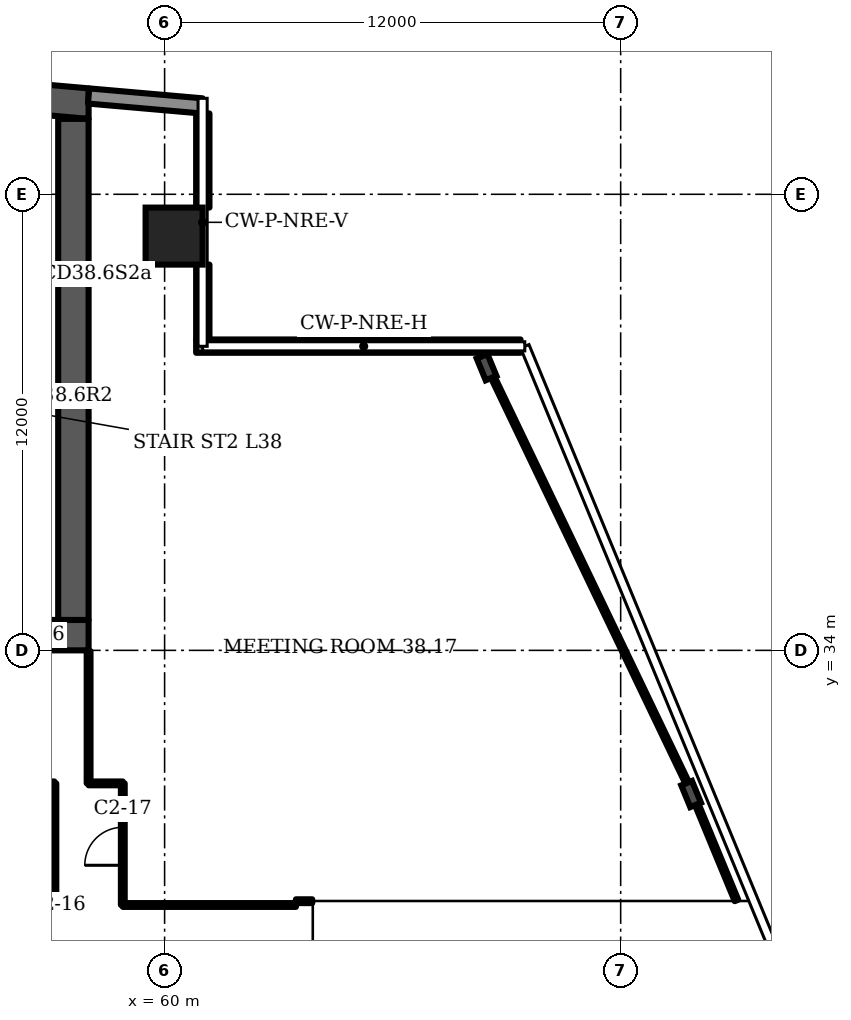
"""IFC4 building model, lengths in metres.
Left out: names, types, materials, properties, quantities, classifications, styles, units other than length and angle.
Written with IfcOpenShell. Run it as: python <this file> out.ifc"""

import sys

from ifc_helpers import new_model, si_unit, direction, frame, frame_2d, origin, origin_2d, place, context, subcontext, project, spatial, polyline, rectangle, i_section, outline, extrude, element, fill, save


model = new_model("IFC4")
c1 = context("Model", 3, precision=1e-05, world=origin(), true_north=direction((0.0, 1.0)))
c2 = subcontext(c1, "Body", "Model", "MODEL_VIEW")
j1 = project(units=[si_unit("LENGTHUNIT", "METRE"), si_unit("PLANEANGLEUNIT", "RADIAN")], contexts=[c1])
p1 = place(None, origin())
s1 = spatial("IfcSite", under=j1, at=p1, CompositionType="ELEMENT")
p2 = place(p1, origin())
s2 = spatial("IfcBuilding", under=s1, at=p2, CompositionType="ELEMENT")
p3 = place(p2, frame((0.0, 0.0, 159.1)))
s3 = spatial("IfcBuildingStorey", under=s2, at=p3, CompositionType="ELEMENT", Elevation=159.1)
p4 = place(p3, frame((0.0, 0.0, -0.0)))
e1 = element("IfcWall", 1, at=p4, inside=s3, PredefinedType="SHEAR", context=c2, shape_type="SweptSolid", body=[
    extrude(outline(polyline([(16.0, 47.984), (37.0, 49.822), (58.0, 47.984), (58.0, 48.787), (37.0, 50.625), (16.0, 48.787), (16.0, 47.984)])), origin(), (0.0, 0.0, 1.0), 3.6),
])
p5 = place(p3, frame((16.0, 34.4, 0.0), z_axis=(0.0, 0.0, 1.0), x_axis=(1.0, 0.0, 0.0)))
e2 = element("IfcWall", 2, at=p5, inside=s3, PredefinedType="SHEAR", context=c2, shape_type="SweptSolid", body=[
    extrude(rectangle(XDim=42.0, YDim=0.8, at=frame_2d((21.0, 0.0))), origin(), (0.0, 0.0, 1.0), 3.6),
])
p6 = place(p5, frame((3.2, 0.0, 0.0)))
e3 = element("IfcOpeningElement", 3, at=p6, cuts=e2, PredefinedType="OPENING", context=c2, shape_type="SweptSolid", body=[
    extrude(rectangle(XDim=1.0, YDim=2.1, at=frame_2d((0.5, 1.05))), frame((0.0, 0.41, 0.0), z_axis=(0.0, -1.0, 0.0), x_axis=(1.0, 0.0, 0.0)), (0.0, 0.0, 1.0), 0.82),
])
p7 = place(p5, frame((7.65, 0.0, 0.0)))
e4 = element("IfcOpeningElement", 4, at=p7, cuts=e2, PredefinedType="OPENING", context=c2, shape_type="SweptSolid", body=[
    extrude(rectangle(XDim=1.2, YDim=2.1, at=frame_2d((0.6, 1.05))), frame((0.0, 0.41, 0.0), z_axis=(0.0, -1.0, 0.0), x_axis=(1.0, 0.0, 0.0)), (0.0, 0.0, 1.0), 0.82),
])
p8 = place(p5, frame((14.767, 0.0, 0.0)))
e5 = element("IfcOpeningElement", 5, at=p8, cuts=e2, PredefinedType="OPENING", context=c2, shape_type="SweptSolid", body=[
    extrude(rectangle(XDim=1.1, YDim=2.1, at=frame_2d((0.55, 1.05))), frame((0.0, 0.41, 0.0), z_axis=(0.0, -1.0, 0.0), x_axis=(1.0, 0.0, 0.0)), (0.0, 0.0, 1.0), 0.82),
])
p9 = place(p5, frame((19.133, 0.0, 0.0)))
e6 = element("IfcOpeningElement", 6, at=p9, cuts=e2, PredefinedType="OPENING", context=c2, shape_type="SweptSolid", body=[
    extrude(rectangle(XDim=1.1, YDim=2.1, at=frame_2d((0.55, 1.05))), frame((0.0, 0.41, 0.0), z_axis=(0.0, -1.0, 0.0), x_axis=(1.0, 0.0, 0.0)), (0.0, 0.0, 1.0), 0.82),
])
p10 = place(p5, frame((16.8, 0.0, 0.0)))
e7 = element("IfcOpeningElement", 7, at=p10, cuts=e2, PredefinedType="OPENING", context=c2, shape_type="SweptSolid", body=[
    extrude(rectangle(XDim=1.4, YDim=2.1, at=frame_2d((0.7, 1.05))), frame((0.0, 0.41, 0.0), z_axis=(0.0, -1.0, 0.0), x_axis=(1.0, 0.0, 0.0)), (0.0, 0.0, 1.0), 0.82),
])
p11 = place(p5, frame((21.767, 0.0, 0.0)))
e8 = element("IfcOpeningElement", 8, at=p11, cuts=e2, PredefinedType="OPENING", context=c2, shape_type="SweptSolid", body=[
    extrude(rectangle(XDim=1.1, YDim=2.1, at=frame_2d((0.55, 1.05))), frame((0.0, 0.41, 0.0), z_axis=(0.0, -1.0, 0.0), x_axis=(1.0, 0.0, 0.0)), (0.0, 0.0, 1.0), 0.82),
])
p12 = place(p5, frame((23.95, 0.0, 0.0)))
e9 = element("IfcOpeningElement", 9, at=p12, cuts=e2, PredefinedType="OPENING", context=c2, shape_type="SweptSolid", body=[
    extrude(rectangle(XDim=1.1, YDim=2.1, at=frame_2d((0.55, 1.05))), frame((0.0, 0.41, 0.0), z_axis=(0.0, -1.0, 0.0), x_axis=(1.0, 0.0, 0.0)), (0.0, 0.0, 1.0), 0.82),
])
p13 = place(p5, frame((26.133, 0.0, 0.0)))
e10 = element("IfcOpeningElement", 10, at=p13, cuts=e2, PredefinedType="OPENING", context=c2, shape_type="SweptSolid", body=[
    extrude(rectangle(XDim=1.1, YDim=2.1, at=frame_2d((0.55, 1.05))), frame((0.0, 0.41, 0.0), z_axis=(0.0, -1.0, 0.0), x_axis=(1.0, 0.0, 0.0)), (0.0, 0.0, 1.0), 0.82),
])
p14 = place(p5, frame((33.15, 0.0, 0.0)))
e11 = element("IfcOpeningElement", 11, at=p14, cuts=e2, PredefinedType="OPENING", context=c2, shape_type="SweptSolid", body=[
    extrude(rectangle(XDim=1.2, YDim=2.1, at=frame_2d((0.6, 1.05))), frame((0.0, 0.41, 0.0), z_axis=(0.0, -1.0, 0.0), x_axis=(1.0, 0.0, 0.0)), (0.0, 0.0, 1.0), 0.82),
])
p15 = place(p5, frame((37.767, 0.0, 0.0)))
e12 = element("IfcOpeningElement", 12, at=p15, cuts=e2, PredefinedType="OPENING", context=c2, shape_type="SweptSolid", body=[
    extrude(rectangle(XDim=1.4, YDim=2.1, at=frame_2d((0.7, 1.05))), frame((0.0, 0.41, 0.0), z_axis=(0.0, -1.0, 0.0), x_axis=(1.0, 0.0, 0.0)), (0.0, 0.0, 1.0), 0.82),
])
p16 = place(p3, frame((57.6, 34.8, 0.0), z_axis=(0.0, 0.0, 1.0), x_axis=(0.0, 1.0, 0.0)))
e13 = element("IfcWall", 13, at=p16, inside=s3, PredefinedType="SHEAR", context=c2, shape_type="SweptSolid", body=[
    extrude(rectangle(XDim=13.184, YDim=0.8, at=frame_2d((6.592, 0.0))), origin(), (0.0, 0.0, 1.0), 3.6),
])
p17 = place(p3, frame((60.25, 44.9, 0.0), z_axis=(0.0, 0.0, 1.0), x_axis=(1.0, 0.0, 0.0)))
e14 = element("IfcColumn", 14, at=p17, inside=s3, PredefinedType="COLUMN", context=c2, shape_type="SweptSolid", body=[
    extrude(rectangle(XDim=1.5, YDim=1.5, at=origin_2d()), origin(), (0.0, 0.0, 1.0), 3.6),
])
for number, where, z_axis, x_axis in (
    (15, (73.854, 30.219, 0.0), (0.0, 0.0, 1.0), (0.924, 0.382, 0.0)),
    (16, (68.472, 41.45, 0.0), (0.0, 0.0, 1.0), (0.924, 0.382, 0.0)),
):
    element("IfcColumn", number, at=place(p3, frame(where, z_axis=z_axis, x_axis=x_axis)), inside=s3, PredefinedType="COLUMN", context=c2, shape_type="SweptSolid", body=[
        extrude(i_section(OverallWidth=0.305, OverallDepth=0.62, WebThickness=0.021, FlangeThickness=0.04, FilletRadius=0.027, at=origin_2d()), origin(), (0.0, 0.0, 1.0), 3.6),
    ])
p18 = place(p3, frame((60.983, 48.326, 0.0), z_axis=(0.0, 0.0, 1.0), x_axis=(-0.996194, 0.087168, 0.0)))
e17 = element("IfcWall", 17, at=p18, inside=s3, PredefinedType="SOLIDWALL", context=c2, shape_type="SweptSolid", body=[
    extrude(rectangle(XDim=2.994, YDim=0.4, at=frame_2d((1.497, 0.0))), origin(), (0.0, 0.0, 1.0), 3.2),
])
p19 = place(p3, frame((69.366, 42.005, 0.0), z_axis=(0.0, 0.0, 1.0), x_axis=(-1.0, 0.0, 0.0)))
e18 = element("IfcWall", 18, at=p19, inside=s3, PredefinedType="SOLIDWALL", context=c2, shape_type="SweptSolid", body=[
    extrude(rectangle(XDim=8.536, YDim=0.35, at=frame_2d((4.268, 0.0))), origin(), (0.0, 0.0, 1.0), 1.0),
])
p20 = place(p3, frame((61.005, 42.18, 0.0), z_axis=(0.0, 0.0, 1.0), x_axis=(0.0, 1.0, 0.0)))
e19 = element("IfcWall", 19, at=p20, inside=s3, PredefinedType="SOLIDWALL", context=c2, shape_type="SweptSolid", body=[
    extrude(rectangle(XDim=1.97, YDim=0.35, at=frame_2d((0.985, 0.0))), origin(), (0.0, 0.0, 1.0), 1.0),
])
p21 = place(p3, frame((61.005, 45.65, 0.0), z_axis=(0.0, 0.0, 1.0), x_axis=(0.0, 1.0, 0.0)))
e20 = element("IfcWall", 20, at=p21, inside=s3, PredefinedType="SOLIDWALL", context=c2, shape_type="SweptSolid", body=[
    extrude(rectangle(XDim=2.477, YDim=0.35, at=frame_2d((1.238, 0.0))), origin(), (0.0, 0.0, 1.0), 1.0),
])
p22 = place(p3, frame((51.4, 40.7, 0.0), z_axis=(0.0, 0.0, 1.0), x_axis=(1.0, 0.0, 0.0)))
e21 = element("IfcWall", 21, at=p22, inside=s3, PredefinedType="PARTITIONING", context=c2, shape_type="SweptSolid", body=[
    extrude(rectangle(XDim=5.8, YDim=0.2, at=frame_2d((2.9, 0.0))), origin(), (0.0, 0.0, 1.0), 3.2),
])
p23 = place(p22, frame((0.367, 0.0, 0.0)))
e22 = element("IfcOpeningElement", 22, at=p23, cuts=e21, PredefinedType="OPENING", context=c2, shape_type="SweptSolid", body=[
    extrude(rectangle(XDim=1.1, YDim=2.1, at=frame_2d((0.55, 1.05))), frame((0.0, 0.11, 0.0), z_axis=(0.0, -1.0, 0.0), x_axis=(1.0, 0.0, 0.0)), (0.0, 0.0, 1.0), 0.22),
])
p24 = place(p22, frame((3.417, 0.0, 0.0)))
e23 = element("IfcOpeningElement", 23, at=p24, cuts=e21, PredefinedType="OPENING", context=c2, shape_type="SweptSolid", body=[
    extrude(rectangle(XDim=1.0, YDim=2.1, at=frame_2d((0.5, 1.05))), frame((0.0, 0.11, 0.0), z_axis=(0.0, -1.0, 0.0), x_axis=(1.0, 0.0, 0.0)), (0.0, 0.0, 1.0), 0.22),
])
p25 = place(p3, frame((51.4, 43.9, 0.0), z_axis=(0.0, 0.0, 1.0), x_axis=(1.0, 0.0, 0.0)))
e24 = element("IfcWall", 24, at=p25, inside=s3, PredefinedType="PARTITIONING", context=c2, shape_type="SweptSolid", body=[
    extrude(rectangle(XDim=5.8, YDim=0.2, at=frame_2d((2.9, 0.0))), origin(), (0.0, 0.0, 1.0), 3.2),
])
p26 = place(p25, frame((2.283, 0.0, 0.0)))
e25 = element("IfcOpeningElement", 25, at=p26, cuts=e24, PredefinedType="OPENING", context=c2, shape_type="SweptSolid", body=[
    extrude(rectangle(XDim=1.0, YDim=2.1, at=frame_2d((0.5, 1.05))), frame((0.0, 0.11, 0.0), z_axis=(0.0, -1.0, 0.0), x_axis=(1.0, 0.0, 0.0)), (0.0, 0.0, 1.0), 0.22),
])
p27 = place(p25, frame((4.167, 0.0, 0.0)))
e26 = element("IfcOpeningElement", 26, at=p27, cuts=e24, PredefinedType="OPENING", context=c2, shape_type="SweptSolid", body=[
    extrude(rectangle(XDim=1.0, YDim=2.1, at=frame_2d((0.5, 1.05))), frame((0.0, 0.11, 0.0), z_axis=(0.0, -1.0, 0.0), x_axis=(1.0, 0.0, 0.0)), (0.0, 0.0, 1.0), 0.22),
])
p28 = place(p3, frame((23.2, 27.3, 0.0), z_axis=(0.0, 0.0, 1.0), x_axis=(1.0, 0.0, 0.0)))
e27 = element("IfcWall", 27, at=p28, inside=s3, PredefinedType="PARTITIONING", context=c2, shape_type="SweptSolid", body=[
    extrude(rectangle(XDim=33.9, YDim=0.1, at=frame_2d((16.95, 0.0))), origin(), (0.0, 0.0, 1.0), 3.2),
])
p29 = place(p28, frame((16.3, 0.0, 0.0)))
e28 = element("IfcOpeningElement", 28, at=p29, cuts=e27, PredefinedType="OPENING", context=c2, shape_type="SweptSolid", body=[
    extrude(rectangle(XDim=1.0, YDim=2.1, at=frame_2d((0.5, 1.05))), frame((0.0, 0.06, 0.0), z_axis=(0.0, -1.0, 0.0), x_axis=(1.0, 0.0, 0.0)), (0.0, 0.0, 1.0), 0.12),
])
p30 = place(p28, frame((20.72, 0.0, 0.0)))
e29 = element("IfcOpeningElement", 29, at=p30, cuts=e27, PredefinedType="OPENING", context=c2, shape_type="SweptSolid", body=[
    extrude(rectangle(XDim=1.0, YDim=2.1, at=frame_2d((0.5, 1.05))), frame((0.0, 0.06, 0.0), z_axis=(0.0, -1.0, 0.0), x_axis=(1.0, 0.0, 0.0)), (0.0, 0.0, 1.0), 0.12),
])
p31 = place(p28, frame((23.54, 0.0, 0.0)))
e30 = element("IfcOpeningElement", 30, at=p31, cuts=e27, PredefinedType="OPENING", context=c2, shape_type="SweptSolid", body=[
    extrude(rectangle(XDim=1.0, YDim=2.1, at=frame_2d((0.5, 1.05))), frame((0.0, 0.06, 0.0), z_axis=(0.0, -1.0, 0.0), x_axis=(1.0, 0.0, 0.0)), (0.0, 0.0, 1.0), 0.12),
])
p32 = place(p28, frame((26.36, 0.0, 0.0)))
e31 = element("IfcOpeningElement", 31, at=p32, cuts=e27, PredefinedType="OPENING", context=c2, shape_type="SweptSolid", body=[
    extrude(rectangle(XDim=1.0, YDim=2.1, at=frame_2d((0.5, 1.05))), frame((0.0, 0.06, 0.0), z_axis=(0.0, -1.0, 0.0), x_axis=(1.0, 0.0, 0.0)), (0.0, 0.0, 1.0), 0.12),
])
p33 = place(p28, frame((29.18, 0.0, 0.0)))
e32 = element("IfcOpeningElement", 32, at=p33, cuts=e27, PredefinedType="OPENING", context=c2, shape_type="SweptSolid", body=[
    extrude(rectangle(XDim=1.0, YDim=2.1, at=frame_2d((0.5, 1.05))), frame((0.0, 0.06, 0.0), z_axis=(0.0, -1.0, 0.0), x_axis=(1.0, 0.0, 0.0)), (0.0, 0.0, 1.0), 0.12),
])
p34 = place(p28, frame((32.0, 0.0, 0.0)))
e33 = element("IfcOpeningElement", 33, at=p34, cuts=e27, PredefinedType="OPENING", context=c2, shape_type="SweptSolid", body=[
    extrude(rectangle(XDim=1.0, YDim=2.1, at=frame_2d((0.5, 1.05))), frame((0.0, 0.06, 0.0), z_axis=(0.0, -1.0, 0.0), x_axis=(1.0, 0.0, 0.0)), (0.0, 0.0, 1.0), 0.12),
])
p35 = place(p3, frame((57.1, 27.3, 0.0), z_axis=(0.0, 0.0, 1.0), x_axis=(0.0, 1.0, 0.0)))
e34 = element("IfcWall", 34, at=p35, inside=s3, PredefinedType="PARTITIONING", context=c2, shape_type="SweptSolid", body=[
    extrude(rectangle(XDim=3.2, YDim=0.1, at=frame_2d((1.6, 0.0))), origin(), (0.0, 0.0, 1.0), 3.2),
])
p36 = place(p3, frame((58.0, 30.5, 0.0), z_axis=(0.0, 0.0, 1.0), x_axis=(0.0, 1.0, 0.0)))
e35 = element("IfcWall", 35, at=p36, inside=s3, PredefinedType="PARTITIONING", context=c2, shape_type="SweptSolid", body=[
    extrude(rectangle(XDim=3.48, YDim=0.1, at=frame_2d((1.74, 0.0))), origin(), (0.0, 0.0, 1.0), 3.2),
])
p37 = place(p3, frame((58.0, 30.5, 0.0), z_axis=(0.0, 0.0, 1.0), x_axis=(1.0, 0.0, 0.0)))
e36 = element("IfcWall", 36, at=p37, inside=s3, PredefinedType="PARTITIONING", context=c2, shape_type="SweptSolid", body=[
    extrude(rectangle(XDim=0.9, YDim=0.1, at=frame_2d((0.45, 0.0))), origin(), (0.0, 0.0, 1.0), 3.2),
])
p38 = place(p3, frame((58.9, 27.3, 0.0), z_axis=(0.0, 0.0, 1.0), x_axis=(0.0, 1.0, 0.0)))
e37 = element("IfcWall", 37, at=p38, inside=s3, PredefinedType="PARTITIONING", context=c2, shape_type="SweptSolid", body=[
    extrude(rectangle(XDim=3.2, YDim=0.1, at=frame_2d((1.6, 0.0))), origin(), (0.0, 0.0, 1.0), 3.2),
])
p39 = place(p38, frame((1.045, 0.0, 0.0)))
e38 = element("IfcOpeningElement", 38, at=p39, cuts=e37, PredefinedType="OPENING", context=c2, shape_type="SweptSolid", body=[
    extrude(rectangle(XDim=1.0, YDim=2.1, at=frame_2d((0.5, 1.05))), frame((0.0, 0.06, 0.0), z_axis=(0.0, -1.0, 0.0), x_axis=(1.0, 0.0, 0.0)), (0.0, 0.0, 1.0), 0.12),
])
p40 = place(p3, frame((58.9, 27.3, 0.0), z_axis=(0.0, 0.0, 1.0), x_axis=(1.0, 0.0, 0.0)))
e39 = element("IfcWall", 39, at=p40, inside=s3, PredefinedType="PARTITIONING", context=c2, shape_type="SweptSolid", body=[
    extrude(rectangle(XDim=4.555, YDim=0.1, at=frame_2d((2.278, 0.0))), origin(), (0.0, 0.0, 1.0), 3.2),
])
p41 = place(p3, frame((63.455, 27.4, 0.0), z_axis=(0.0, 0.0, 1.0), x_axis=(1.0, 0.0, 0.0)))
e40 = element("IfcWall", 40, at=p41, inside=s3, PredefinedType="PARTITIONING", context=c2, shape_type="SweptSolid", body=[
    extrude(rectangle(XDim=0.429, YDim=0.1, at=frame_2d((0.215, 0.0))), origin(), (0.0, 0.0, 1.0), 3.2),
])
p42 = place(p3, frame((73.885, 30.23, 0.0), z_axis=(0.0, 0.0, 1.0), x_axis=(-0.432167, 0.90179, 0.0)))
e41 = element("IfcWall", 41, at=p42, inside=s3, PredefinedType="PARTITIONING", context=c2, shape_type="SweptSolid", body=[
    extrude(rectangle(XDim=13.036, YDim=0.1, at=frame_2d((6.518, 0.0))), origin(), (0.0, 0.0, 1.0), 2.58),
])
p43 = place(p3, frame((75.047, 27.42, 0.0), z_axis=(0.0, 0.0, 1.0), x_axis=(-0.382024, 0.924148, 0.0)))
e42 = element("IfcWall", 42, at=p43, inside=s3, PredefinedType="PARTITIONING", context=c2, shape_type="SweptSolid", body=[
    extrude(rectangle(XDim=3.041, YDim=0.1, at=frame_2d((1.521, 0.0))), origin(), (0.0, 0.0, 1.0), 2.58),
])
p44 = place(p3, frame((44.15, 30.5, 0.0), z_axis=(0.0, 0.0, 1.0), x_axis=(1.0, 0.0, 0.0)))
e43 = element("IfcWall", 43, at=p44, inside=s3, PredefinedType="PARTITIONING", context=c2, shape_type="SweptSolid", body=[
    extrude(rectangle(XDim=12.95, YDim=0.1, at=frame_2d((6.475, 0.0))), origin(), (0.0, 0.0, 1.0), 3.2),
])
p45 = place(p39, origin())
e44 = element("IfcDoor", 44, at=p45, inside=s3, OperationType="SINGLE_SWING_LEFT", PredefinedType="DOOR", context=c2, shape_type="SweptSolid", body=[
    extrude(rectangle(XDim=1.0, YDim=2.1, at=frame_2d((0.5, 1.05))), frame((0.0, 0.025, 0.0), z_axis=(0.0, -1.0, 0.0), x_axis=(1.0, 0.0, 0.0)), (0.0, 0.0, 1.0), 0.05),
])
fill(e38, e44)
save(model, sys.argv[1])
